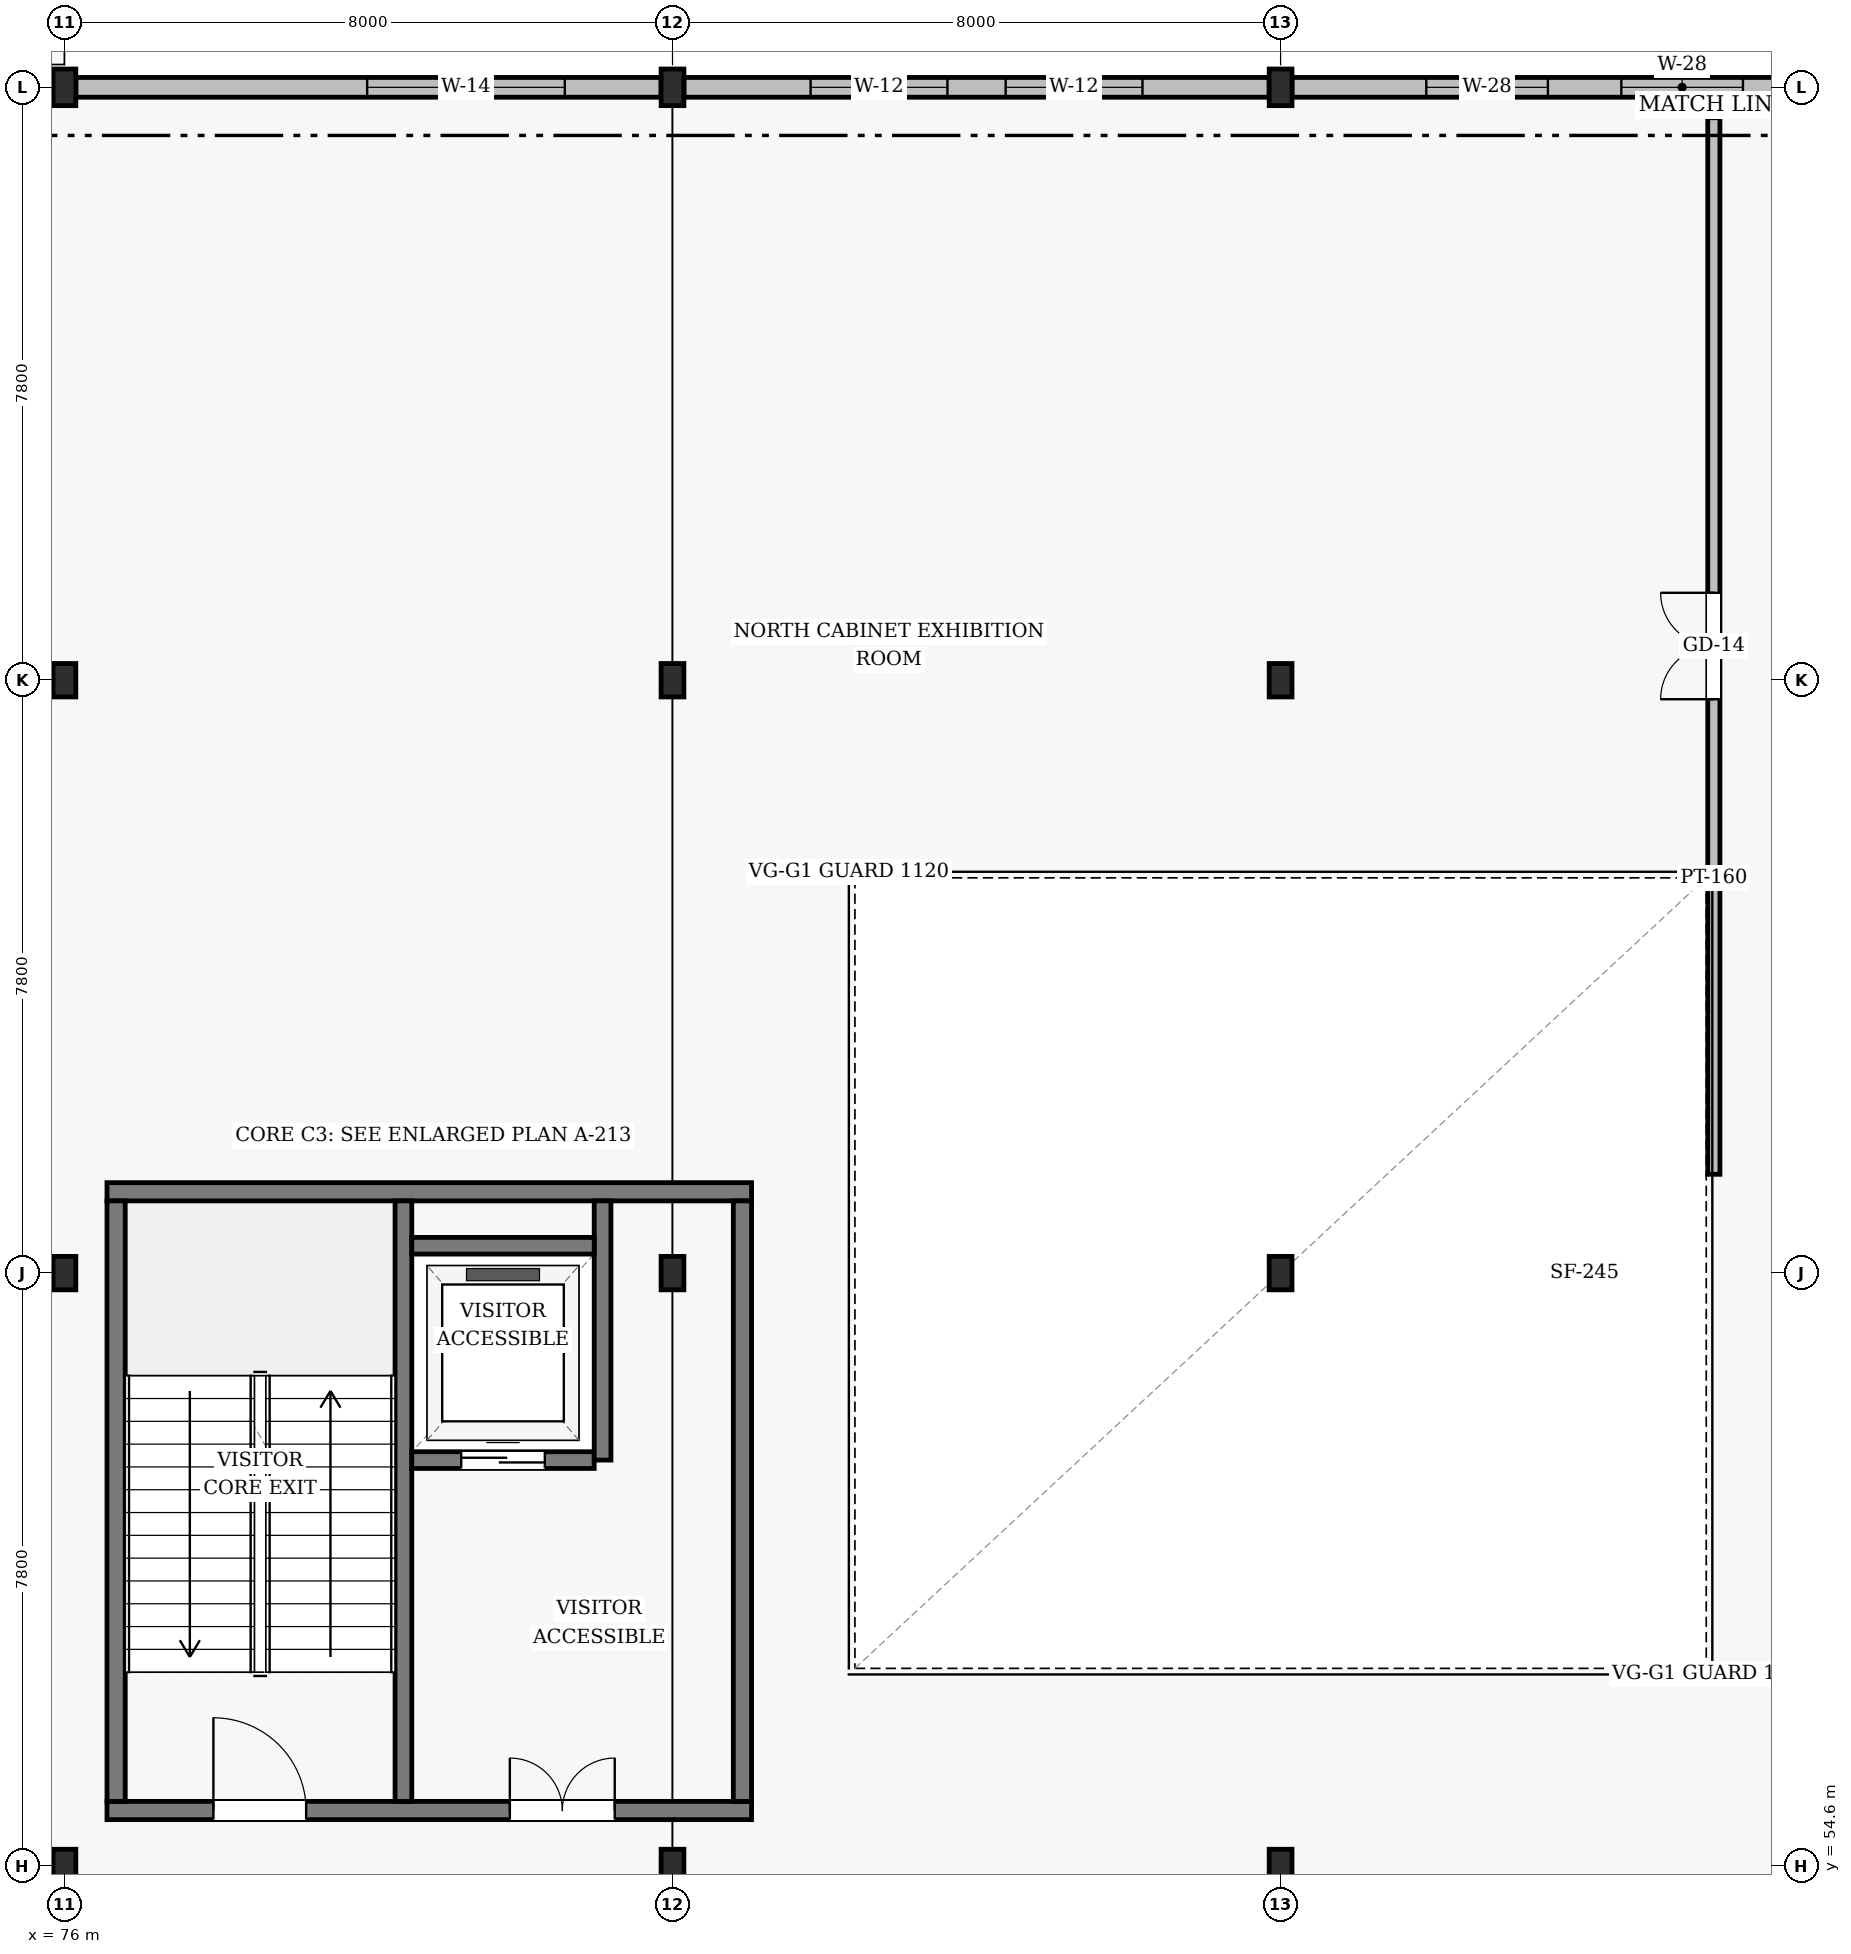
"""IFC4 building model, lengths in metres.
Left out: names, types, materials, properties, quantities, classifications, styles, units other than length and angle.
Written with IfcOpenShell. Run it as: python <this file> out.ifc"""

import sys

from ifc_helpers import new_model, si_unit, direction, frame, frame_2d, origin, origin_2d, place, context, subcontext, project, spatial, rectangle, i_section, extrude, element, fill, save


model = new_model("IFC4")
c1 = context("Model", 3, precision=1e-05, world=origin(), true_north=direction((0.0, 1.0)))
c2 = subcontext(c1, "Body", "Model", "MODEL_VIEW")
j1 = project(units=[si_unit("LENGTHUNIT", "METRE"), si_unit("PLANEANGLEUNIT", "RADIAN")], contexts=[c1])
p1 = place(None, origin())
s1 = spatial("IfcSite", under=j1, at=p1, CompositionType="ELEMENT")
p2 = place(p1, origin())
s2 = spatial("IfcBuilding", under=s1, at=p2, CompositionType="ELEMENT")
p3 = place(p2, frame((0.0, 0.0, 9.0)))
s3 = spatial("IfcBuildingStorey", under=s2, at=p3, CompositionType="ELEMENT", Elevation=9.0)
for number, where, z_axis, x_axis in (
    (1, (76.0, 54.6, 0.0), (0.0, 0.0, 1.0), (1.0, 0.0, 0.0)),
    (2, (76.0, 62.4, 0.0), (0.0, 0.0, 1.0), (1.0, 0.0, 0.0)),
    (3, (76.0, 70.2, 0.0), (0.0, 0.0, 1.0), (1.0, 0.0, 0.0)),
):
    element("IfcColumn", number, at=place(p3, frame(where, z_axis=z_axis, x_axis=x_axis)), inside=s3, PredefinedType="COLUMN", context=c2, shape_type="SweptSolid", body=[
        extrude(i_section(OverallWidth=0.3, OverallDepth=0.44, WebThickness=0.011, FlangeThickness=0.018, FilletRadius=0.024, at=origin_2d()), origin(), (0.0, 0.0, 1.0), 4.2),
    ])
p4 = place(p3, frame((76.0, 78.0, 0.0), z_axis=(0.0, 0.0, 1.0), x_axis=(1.0, 0.0, 0.0)))
e4 = element("IfcColumn", 4, at=p4, inside=s3, PredefinedType="COLUMN", context=c2, shape_type="SweptSolid", body=[
    extrude(i_section(OverallWidth=0.3, OverallDepth=0.482, WebThickness=0.011, FlangeThickness=0.015, FilletRadius=0.024, at=origin_2d()), origin(), (0.0, 0.0, 1.0), 4.2),
])
for number, where, z_axis, x_axis in (
    (5, (84.0, 54.6, 0.0), (0.0, 0.0, 1.0), (1.0, 0.0, 0.0)),
    (6, (84.0, 62.4, 0.0), (0.0, 0.0, 1.0), (1.0, 0.0, 0.0)),
    (7, (84.0, 70.2, 0.0), (0.0, 0.0, 1.0), (1.0, 0.0, 0.0)),
):
    element("IfcColumn", number, at=place(p3, frame(where, z_axis=z_axis, x_axis=x_axis)), inside=s3, PredefinedType="COLUMN", context=c2, shape_type="SweptSolid", body=[
        extrude(i_section(OverallWidth=0.3, OverallDepth=0.44, WebThickness=0.011, FlangeThickness=0.018, FilletRadius=0.024, at=origin_2d()), origin(), (0.0, 0.0, 1.0), 4.2),
    ])
p5 = place(p3, frame((84.0, 78.0, 0.0), z_axis=(0.0, 0.0, 1.0), x_axis=(1.0, 0.0, 0.0)))
e8 = element("IfcColumn", 8, at=p5, inside=s3, PredefinedType="COLUMN", context=c2, shape_type="SweptSolid", body=[
    extrude(i_section(OverallWidth=0.3, OverallDepth=0.482, WebThickness=0.011, FlangeThickness=0.015, FilletRadius=0.024, at=origin_2d()), origin(), (0.0, 0.0, 1.0), 4.2),
])
for number, where, z_axis, x_axis in (
    (9, (92.0, 54.6, 0.0), (0.0, 0.0, 1.0), (1.0, 0.0, 0.0)),
    (10, (92.0, 62.4, 0.0), (0.0, 0.0, 1.0), (1.0, 0.0, 0.0)),
    (11, (92.0, 70.2, 0.0), (0.0, 0.0, 1.0), (1.0, 0.0, 0.0)),
):
    element("IfcColumn", number, at=place(p3, frame(where, z_axis=z_axis, x_axis=x_axis)), inside=s3, PredefinedType="COLUMN", context=c2, shape_type="SweptSolid", body=[
        extrude(i_section(OverallWidth=0.3, OverallDepth=0.44, WebThickness=0.011, FlangeThickness=0.018, FilletRadius=0.024, at=origin_2d()), origin(), (0.0, 0.0, 1.0), 4.2),
    ])
p6 = place(p3, frame((92.0, 78.0, 0.0), z_axis=(0.0, 0.0, 1.0), x_axis=(1.0, 0.0, 0.0)))
e12 = element("IfcColumn", 12, at=p6, inside=s3, PredefinedType="COLUMN", context=c2, shape_type="SweptSolid", body=[
    extrude(i_section(OverallWidth=0.3, OverallDepth=0.482, WebThickness=0.011, FlangeThickness=0.015, FilletRadius=0.024, at=origin_2d()), origin(), (0.0, 0.0, 1.0), 4.2),
])
p7 = place(p3, frame((99.85, 78.0, 0.0), z_axis=(0.0, 0.0, 1.0), x_axis=(-1.0, 0.0, 0.0)))
e13 = element("IfcWall", 13, at=p7, inside=s3, PredefinedType="SOLIDWALL", context=c2, shape_type="SweptSolid", body=[
    extrude(rectangle(XDim=7.7, YDim=0.26, at=frame_2d((3.85, 0.0))), origin(), (0.0, 0.0, 1.0), 3.188),
])
p8 = place(p7, frame((1.767, 0.0, 0.8)))
e14 = element("IfcOpeningElement", 14, at=p8, cuts=e13, PredefinedType="OPENING", context=c2, shape_type="SweptSolid", body=[
    extrude(rectangle(XDim=1.6, YDim=2.09, at=frame_2d((0.8, 1.045))), frame((0.0, 0.14, 0.0), z_axis=(0.0, -1.0, 0.0), x_axis=(1.0, 0.0, 0.0)), (0.0, 0.0, 1.0), 0.28),
])
p9 = place(p7, frame((4.333, 0.0, 0.8)))
e15 = element("IfcOpeningElement", 15, at=p9, cuts=e13, PredefinedType="OPENING", context=c2, shape_type="SweptSolid", body=[
    extrude(rectangle(XDim=1.6, YDim=2.09, at=frame_2d((0.8, 1.045))), frame((0.0, 0.14, 0.0), z_axis=(0.0, -1.0, 0.0), x_axis=(1.0, 0.0, 0.0)), (0.0, 0.0, 1.0), 0.28),
])
p10 = place(p3, frame((91.85, 78.0, 0.0), z_axis=(0.0, 0.0, 1.0), x_axis=(-1.0, 0.0, 0.0)))
e16 = element("IfcWall", 16, at=p10, inside=s3, PredefinedType="SOLIDWALL", context=c2, shape_type="SweptSolid", body=[
    extrude(rectangle(XDim=7.7, YDim=0.26, at=frame_2d((3.85, 0.0))), origin(), (0.0, 0.0, 1.0), 3.188),
])
p11 = place(p10, frame((1.667, 0.0, 0.75)))
e17 = element("IfcOpeningElement", 17, at=p11, cuts=e16, PredefinedType="OPENING", context=c2, shape_type="SweptSolid", body=[
    extrude(rectangle(XDim=1.8, YDim=2.14, at=frame_2d((0.9, 1.07))), frame((0.0, 0.14, 0.0), z_axis=(0.0, -1.0, 0.0), x_axis=(1.0, 0.0, 0.0)), (0.0, 0.0, 1.0), 0.28),
])
p12 = place(p10, frame((4.233, 0.0, 0.75)))
e18 = element("IfcOpeningElement", 18, at=p12, cuts=e16, PredefinedType="OPENING", context=c2, shape_type="SweptSolid", body=[
    extrude(rectangle(XDim=1.8, YDim=2.14, at=frame_2d((0.9, 1.07))), frame((0.0, 0.14, 0.0), z_axis=(0.0, -1.0, 0.0), x_axis=(1.0, 0.0, 0.0)), (0.0, 0.0, 1.0), 0.28),
])
p13 = place(p3, frame((83.85, 78.0, 0.0), z_axis=(0.0, 0.0, 1.0), x_axis=(-1.0, 0.0, 0.0)))
e19 = element("IfcWall", 19, at=p13, inside=s3, PredefinedType="SOLIDWALL", context=c2, shape_type="SweptSolid", body=[
    extrude(rectangle(XDim=7.7, YDim=0.26, at=frame_2d((3.85, 0.0))), origin(), (0.0, 0.0, 1.0), 3.188),
])
p14 = place(p13, frame((1.267, 0.0, 0.75)))
e20 = element("IfcOpeningElement", 20, at=p14, cuts=e19, PredefinedType="OPENING", context=c2, shape_type="SweptSolid", body=[
    extrude(rectangle(XDim=2.6, YDim=2.14, at=frame_2d((1.3, 1.07))), frame((0.0, 0.14, 0.0), z_axis=(0.0, -1.0, 0.0), x_axis=(1.0, 0.0, 0.0)), (0.0, 0.0, 1.0), 0.28),
])
p15 = place(p3, frame((75.85, 78.0, 0.0), z_axis=(0.0, 0.0, 1.0), x_axis=(-1.0, 0.0, 0.0)))
e21 = element("IfcWall", 21, at=p15, inside=s3, PredefinedType="SOLIDWALL", context=c2, shape_type="SweptSolid", body=[
    extrude(rectangle(XDim=7.7, YDim=0.26, at=frame_2d((3.85, 0.0))), origin(), (0.0, 0.0, 1.0), 1.575),
])
p16 = place(p3, frame((76.56, 55.33, 0.0), z_axis=(0.0, 0.0, 1.0), x_axis=(1.0, 0.0, 0.0)))
e22 = element("IfcWall", 22, at=p16, inside=s3, PredefinedType="SHEAR", context=c2, shape_type="SweptSolid", body=[
    extrude(rectangle(XDim=8.48, YDim=0.24, at=frame_2d((4.24, 0.0))), origin(), (0.0, 0.0, 1.0), 3.935),
])
p17 = place(p16, frame((1.4, 0.0, 0.0)))
e23 = element("IfcOpeningElement", 23, at=p17, cuts=e22, PredefinedType="OPENING", context=c2, shape_type="SweptSolid", body=[
    extrude(rectangle(XDim=1.22, YDim=2.18, at=frame_2d((0.61, 1.09))), frame((0.0, 0.13, 0.0), z_axis=(0.0, -1.0, 0.0), x_axis=(1.0, 0.0, 0.0)), (0.0, 0.0, 1.0), 0.26),
])
p18 = place(p16, frame((5.3, 0.0, 0.0)))
e24 = element("IfcOpeningElement", 24, at=p18, cuts=e22, PredefinedType="OPENING", context=c2, shape_type="SweptSolid", body=[
    extrude(rectangle(XDim=1.38, YDim=2.15, at=frame_2d((0.69, 1.075))), frame((0.0, 0.13, 0.0), z_axis=(0.0, -1.0, 0.0), x_axis=(1.0, 0.0, 0.0)), (0.0, 0.0, 1.0), 0.26),
])
p19 = place(p3, frame((76.56, 63.47, 0.0), z_axis=(0.0, 0.0, 1.0), x_axis=(1.0, 0.0, 0.0)))
e25 = element("IfcWall", 25, at=p19, inside=s3, PredefinedType="SHEAR", context=c2, shape_type="SweptSolid", body=[
    extrude(rectangle(XDim=8.48, YDim=0.24, at=frame_2d((4.24, 0.0))), origin(), (0.0, 0.0, 1.0), 3.935),
])
p20 = place(p3, frame((76.68, 55.45, 0.0), z_axis=(0.0, 0.0, 1.0), x_axis=(0.0, 1.0, 0.0)))
e26 = element("IfcWall", 26, at=p20, inside=s3, PredefinedType="SHEAR", context=c2, shape_type="SweptSolid", body=[
    extrude(rectangle(XDim=7.9, YDim=0.24, at=frame_2d((3.95, 0.0))), origin(), (0.0, 0.0, 1.0), 3.935),
])
p21 = place(p3, frame((80.46, 55.45, 0.0), z_axis=(0.0, 0.0, 1.0), x_axis=(0.0, 1.0, 0.0)))
e27 = element("IfcWall", 27, at=p21, inside=s3, PredefinedType="SHEAR", context=c2, shape_type="SweptSolid", body=[
    extrude(rectangle(XDim=7.9, YDim=0.22, at=frame_2d((3.95, 0.0))), origin(), (0.0, 0.0, 1.0), 3.935),
])
p22 = place(p3, frame((84.92, 55.45, 0.0), z_axis=(0.0, 0.0, 1.0), x_axis=(0.0, 1.0, 0.0)))
e28 = element("IfcWall", 28, at=p22, inside=s3, PredefinedType="SHEAR", context=c2, shape_type="SweptSolid", body=[
    extrude(rectangle(XDim=7.9, YDim=0.24, at=frame_2d((3.95, 0.0))), origin(), (0.0, 0.0, 1.0), 3.935),
])
p23 = place(p3, frame((80.57, 59.94, 0.0), z_axis=(0.0, 0.0, 1.0), x_axis=(1.0, 0.0, 0.0)))
e29 = element("IfcWall", 29, at=p23, inside=s3, PredefinedType="SHEAR", context=c2, shape_type="SweptSolid", body=[
    extrude(rectangle(XDim=2.4, YDim=0.22, at=frame_2d((1.2, 0.0))), origin(), (0.0, 0.0, 1.0), 3.935),
])
p24 = place(p23, frame((0.65, 0.0, 0.0)))
e30 = element("IfcOpeningElement", 30, at=p24, cuts=e29, PredefinedType="OPENING", context=c2, shape_type="SweptSolid", body=[
    extrude(rectangle(XDim=1.1, YDim=2.15, at=frame_2d((0.55, 1.075))), frame((0.0, 0.12, 0.0), z_axis=(0.0, -1.0, 0.0), x_axis=(1.0, 0.0, 0.0)), (0.0, 0.0, 1.0), 0.24),
])
p25 = place(p3, frame((83.08, 59.94, 0.0), z_axis=(0.0, 0.0, 1.0), x_axis=(0.0, 1.0, 0.0)))
e31 = element("IfcWall", 31, at=p25, inside=s3, PredefinedType="SHEAR", context=c2, shape_type="SweptSolid", body=[
    extrude(rectangle(XDim=3.41, YDim=0.22, at=frame_2d((1.705, 0.0))), origin(), (0.0, 0.0, 1.0), 3.935),
])
p26 = place(p3, frame((80.57, 62.76, 0.0), z_axis=(0.0, 0.0, 1.0), x_axis=(1.0, 0.0, 0.0)))
e32 = element("IfcWall", 32, at=p26, inside=s3, PredefinedType="SHEAR", context=c2, shape_type="SweptSolid", body=[
    extrude(rectangle(XDim=2.4, YDim=0.22, at=frame_2d((1.2, 0.0))), origin(), (0.0, 0.0, 1.0), 3.935),
])
p27 = place(p3, frame((97.7, 63.7, 0.0), z_axis=(0.0, 0.0, 1.0), x_axis=(0.0, 1.0, 0.0)))
e33 = element("IfcWall", 33, at=p27, inside=s3, PredefinedType="PARTITIONING", context=c2, shape_type="SweptSolid", body=[
    extrude(rectangle(XDim=13.9, YDim=0.16, at=frame_2d((6.95, 0.0))), origin(), (0.0, 0.0, 1.0), 3.33),
])
p28 = place(p27, frame((6.25, 0.0, 0.0)))
e34 = element("IfcOpeningElement", 34, at=p28, cuts=e33, PredefinedType="OPENING", context=c2, shape_type="SweptSolid", body=[
    extrude(rectangle(XDim=1.4, YDim=2.1, at=frame_2d((0.7, 1.05))), frame((0.0, 0.09, 0.0), z_axis=(0.0, -1.0, 0.0), x_axis=(1.0, 0.0, 0.0)), (0.0, 0.0, 1.0), 0.18),
])
p29 = place(p8, origin())
e35 = element("IfcWindow", 35, at=p29, inside=s3, PartitioningType="SINGLE_PANEL", PredefinedType="WINDOW", context=c2, shape_type="SweptSolid", body=[
    extrude(rectangle(XDim=1.6, YDim=2.09, at=frame_2d((0.8, 1.045))), frame((0.0, 0.03, 0.0), z_axis=(0.0, -1.0, 0.0), x_axis=(1.0, 0.0, 0.0)), (0.0, 0.0, 1.0), 0.06),
])
fill(e14, e35)
p30 = place(p9, origin())
e36 = element("IfcWindow", 36, at=p30, inside=s3, PartitioningType="SINGLE_PANEL", PredefinedType="WINDOW", context=c2, shape_type="SweptSolid", body=[
    extrude(rectangle(XDim=1.6, YDim=2.09, at=frame_2d((0.8, 1.045))), frame((0.0, 0.03, 0.0), z_axis=(0.0, -1.0, 0.0), x_axis=(1.0, 0.0, 0.0)), (0.0, 0.0, 1.0), 0.06),
])
fill(e15, e36)
p31 = place(p11, origin())
e37 = element("IfcWindow", 37, at=p31, inside=s3, PartitioningType="SINGLE_PANEL", PredefinedType="WINDOW", context=c2, shape_type="SweptSolid", body=[
    extrude(rectangle(XDim=1.8, YDim=2.14, at=frame_2d((0.9, 1.07))), frame((0.0, 0.03, 0.0), z_axis=(0.0, -1.0, 0.0), x_axis=(1.0, 0.0, 0.0)), (0.0, 0.0, 1.0), 0.06),
])
fill(e17, e37)
p32 = place(p12, origin())
e38 = element("IfcWindow", 38, at=p32, inside=s3, PartitioningType="SINGLE_PANEL", PredefinedType="WINDOW", context=c2, shape_type="SweptSolid", body=[
    extrude(rectangle(XDim=1.8, YDim=2.14, at=frame_2d((0.9, 1.07))), frame((0.0, 0.03, 0.0), z_axis=(0.0, -1.0, 0.0), x_axis=(1.0, 0.0, 0.0)), (0.0, 0.0, 1.0), 0.06),
])
fill(e18, e38)
p33 = place(p14, origin())
e39 = element("IfcWindow", 39, at=p33, inside=s3, PartitioningType="SINGLE_PANEL", PredefinedType="WINDOW", context=c2, shape_type="SweptSolid", body=[
    extrude(rectangle(XDim=2.6, YDim=2.14, at=frame_2d((1.3, 1.07))), frame((0.0, 0.03, 0.0), z_axis=(0.0, -1.0, 0.0), x_axis=(1.0, 0.0, 0.0)), (0.0, 0.0, 1.0), 0.06),
])
fill(e20, e39)
p34 = place(p17, origin())
e40 = element("IfcDoor", 40, at=p34, inside=s3, OperationType="SINGLE_SWING_LEFT", PredefinedType="DOOR", context=c2, shape_type="SweptSolid", body=[
    extrude(rectangle(XDim=1.22, YDim=2.18, at=frame_2d((0.61, 1.09))), frame((0.0, 0.025, 0.0), z_axis=(0.0, -1.0, 0.0), x_axis=(1.0, 0.0, 0.0)), (0.0, 0.0, 1.0), 0.05),
])
fill(e23, e40)
p35 = place(p18, frame((1.38, 0.0, 0.0), z_axis=(0.0, 0.0, 1.0), x_axis=(-1.0, 0.0, 0.0)))
e41 = element("IfcDoor", 41, at=p35, inside=s3, OperationType="DOUBLE_DOOR_SINGLE_SWING", PredefinedType="DOOR", context=c2, shape_type="SweptSolid", body=[
    extrude(rectangle(XDim=1.38, YDim=2.15, at=frame_2d((0.69, 1.075))), frame((0.0, 0.025, 0.0), z_axis=(0.0, -1.0, 0.0), x_axis=(1.0, 0.0, 0.0)), (0.0, 0.0, 1.0), 0.05),
])
fill(e24, e41)
p36 = place(p24, origin())
e42 = element("IfcDoor", 42, at=p36, inside=s3, OperationType="SLIDING_TO_LEFT", PredefinedType="DOOR", context=c2, shape_type="SweptSolid", body=[
    extrude(rectangle(XDim=1.1, YDim=2.15, at=frame_2d((0.55, 1.075))), frame((0.0, 0.025, 0.0), z_axis=(0.0, -1.0, 0.0), x_axis=(1.0, 0.0, 0.0)), (0.0, 0.0, 1.0), 0.05),
])
fill(e30, e42)
p37 = place(p28, origin())
e43 = element("IfcDoor", 43, at=p37, inside=s3, OperationType="DOUBLE_DOOR_SINGLE_SWING", PredefinedType="DOOR", context=c2, shape_type="SweptSolid", body=[
    extrude(rectangle(XDim=1.4, YDim=2.1, at=frame_2d((0.7, 1.05))), frame((0.0, 0.025, 0.0), z_axis=(0.0, -1.0, 0.0), x_axis=(1.0, 0.0, 0.0)), (0.0, 0.0, 1.0), 0.05),
])
fill(e34, e43)
save(model, sys.argv[1])
